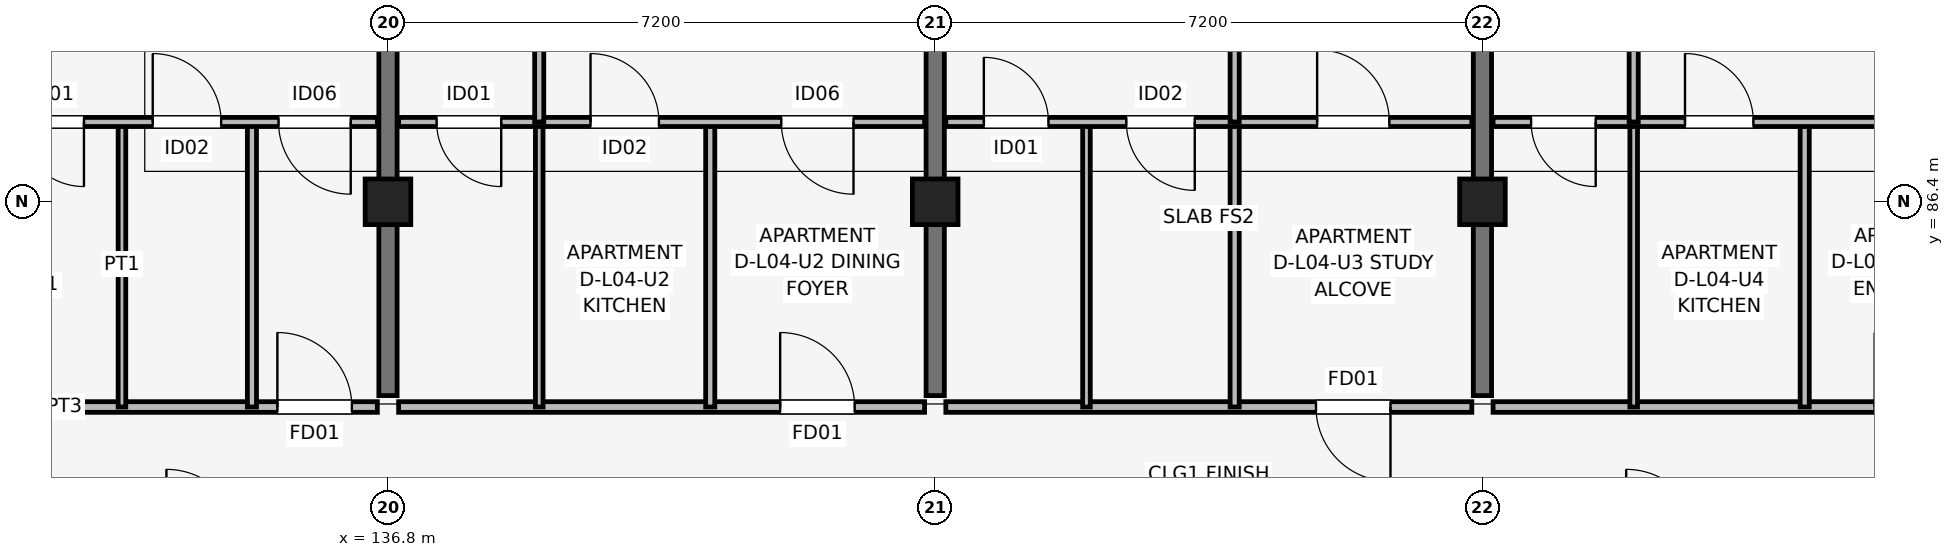
"""IFC4 building model, lengths in metres.
Left out: names, types, materials, properties, quantities, classifications, styles, units other than length and angle.
Written with IfcOpenShell. Run it as: python <this file> out.ifc"""

import sys

from ifc_helpers import new_model, si_unit, direction, frame, frame_2d, origin, origin_2d, place, context, subcontext, project, spatial, rectangle, extrude, element, fill, save


model = new_model("IFC4")
c1 = context("Model", 3, precision=1e-05, world=origin(), true_north=direction((0.0, 1.0)))
c2 = subcontext(c1, "Body", "Model", "MODEL_VIEW")
j1 = project(units=[si_unit("LENGTHUNIT", "METRE"), si_unit("PLANEANGLEUNIT", "RADIAN")], contexts=[c1])
p1 = place(None, origin())
s1 = spatial("IfcSite", under=j1, at=p1, CompositionType="ELEMENT")
p2 = place(p1, origin())
s2 = spatial("IfcBuilding", under=s1, at=p2, CompositionType="ELEMENT")
p3 = place(p2, frame((0.0, 0.0, 15.0)))
s3 = spatial("IfcBuildingStorey", under=s2, at=p3, CompositionType="ELEMENT", Elevation=15.0)
for number, where, z_axis, x_axis in (
    (1, (136.8, 86.4, 0.0), (0.0, 0.0, 1.0), (1.0, 0.0, 0.0)),
    (2, (144.0, 86.4, 0.0), (0.0, 0.0, 1.0), (1.0, 0.0, 0.0)),
    (3, (151.2, 86.4, 0.0), (0.0, 0.0, 1.0), (1.0, 0.0, 0.0)),
):
    element("IfcColumn", number, at=place(p3, frame(where, z_axis=z_axis, x_axis=x_axis)), inside=s3, PredefinedType="COLUMN", context=c2, shape_type="SweptSolid", body=[
        extrude(rectangle(XDim=0.6, YDim=0.6, at=origin_2d()), origin(), (0.0, 0.0, 1.0), 3.15),
    ])
for number, where, z_axis, x_axis in (
    (4, (136.8, 83.85, 0.0), (0.0, 0.0, 1.0), (0.0, 1.0, 0.0)),
    (5, (144.0, 83.85, 0.0), (0.0, 0.0, 1.0), (0.0, 1.0, 0.0)),
    (6, (151.2, 83.85, 0.0), (0.0, 0.0, 1.0), (0.0, 1.0, 0.0)),
):
    element("IfcWall", number, at=place(p3, frame(where, z_axis=z_axis, x_axis=x_axis)), inside=s3, PredefinedType="SHEAR", context=c2, shape_type="SweptSolid", body=[
        extrude(rectangle(XDim=9.4, YDim=0.24, at=frame_2d((4.7, 0.0))), origin(), (0.0, 0.0, 1.0), 3.15),
    ])
p4 = place(p3, frame((129.74, 83.7, 0.0), z_axis=(0.0, 0.0, 1.0), x_axis=(1.0, 0.0, 0.0)))
e7 = element("IfcWall", 7, at=p4, inside=s3, PredefinedType="PARTITIONING", context=c2, shape_type="SweptSolid", body=[
    extrude(rectangle(XDim=6.92, YDim=0.14, at=frame_2d((3.46, 0.0))), origin(), (0.0, 0.0, 1.0), 2.38),
])
p5 = place(p4, frame((5.605, 0.0, 0.0)))
e8 = element("IfcOpeningElement", 8, at=p5, cuts=e7, PredefinedType="OPENING", context=c2, shape_type="SweptSolid", body=[
    extrude(rectangle(XDim=0.98, YDim=2.1, at=frame_2d((0.49, 1.05))), frame((0.0, 0.08, 0.0), z_axis=(0.0, -1.0, 0.0), x_axis=(1.0, 0.0, 0.0)), (0.0, 0.0, 1.0), 0.16),
])
p6 = place(p3, frame((133.3, 83.7, 0.0), z_axis=(0.0, 0.0, 1.0), x_axis=(0.0, 1.0, 0.0)))
e9 = element("IfcWall", 9, at=p6, inside=s3, PredefinedType="PARTITIONING", context=c2, shape_type="SweptSolid", body=[
    extrude(rectangle(XDim=3.75, YDim=0.1, at=frame_2d((1.875, 0.0))), origin(), (0.0, 0.0, 1.0), 2.375),
])
p7 = place(p3, frame((135.01, 83.7, 0.0), z_axis=(0.0, 0.0, 1.0), x_axis=(0.0, 1.0, 0.0)))
e10 = element("IfcWall", 10, at=p7, inside=s3, PredefinedType="PARTITIONING", context=c2, shape_type="SweptSolid", body=[
    extrude(rectangle(XDim=3.75, YDim=0.12, at=frame_2d((1.875, 0.0))), origin(), (0.0, 0.0, 1.0), 2.375),
])
p8 = place(p3, frame((129.74, 87.45, 0.0), z_axis=(0.0, 0.0, 1.0), x_axis=(1.0, 0.0, 0.0)))
e11 = element("IfcWall", 11, at=p8, inside=s3, PredefinedType="PARTITIONING", context=c2, shape_type="SweptSolid", body=[
    extrude(rectangle(XDim=6.92, YDim=0.12, at=frame_2d((3.46, 0.0))), origin(), (0.0, 0.0, 1.0), 2.38),
])
p9 = place(p8, frame((3.06, 0.0, 0.0), z_axis=(0.0, 0.0, 1.0), x_axis=(-1.0, 0.0, 0.0)))
e12 = element("IfcOpeningElement", 12, at=p9, cuts=e11, PredefinedType="OPENING", context=c2, shape_type="SweptSolid", body=[
    extrude(rectangle(XDim=0.85, YDim=2.08, at=frame_2d((0.425, 1.04))), frame((0.0, 0.07, 0.0), z_axis=(0.0, -1.0, 0.0), x_axis=(1.0, 0.0, 0.0)), (0.0, 0.0, 1.0), 0.14),
])
p10 = place(p8, frame((3.965, 0.0, 0.0)))
e13 = element("IfcOpeningElement", 13, at=p10, cuts=e11, PredefinedType="OPENING", context=c2, shape_type="SweptSolid", body=[
    extrude(rectangle(XDim=0.9, YDim=2.08, at=frame_2d((0.45, 1.04))), frame((0.0, 0.07, 0.0), z_axis=(0.0, -1.0, 0.0), x_axis=(1.0, 0.0, 0.0)), (0.0, 0.0, 1.0), 0.14),
])
p11 = place(p8, frame((6.57, 0.0, 0.0), z_axis=(0.0, 0.0, 1.0), x_axis=(-1.0, 0.0, 0.0)))
e14 = element("IfcOpeningElement", 14, at=p11, cuts=e11, PredefinedType="OPENING", context=c2, shape_type="SweptSolid", body=[
    extrude(rectangle(XDim=0.95, YDim=2.08, at=frame_2d((0.475, 1.04))), frame((0.0, 0.07, 0.0), z_axis=(0.0, -1.0, 0.0), x_axis=(1.0, 0.0, 0.0)), (0.0, 0.0, 1.0), 0.14),
])
p12 = place(p3, frame((136.94, 83.7, 0.0), z_axis=(0.0, 0.0, 1.0), x_axis=(1.0, 0.0, 0.0)))
e15 = element("IfcWall", 15, at=p12, inside=s3, PredefinedType="PARTITIONING", context=c2, shape_type="SweptSolid", body=[
    extrude(rectangle(XDim=6.92, YDim=0.14, at=frame_2d((3.46, 0.0))), origin(), (0.0, 0.0, 1.0), 2.38),
])
p13 = place(p12, frame((5.02, 0.0, 0.0)))
e16 = element("IfcOpeningElement", 16, at=p13, cuts=e15, PredefinedType="OPENING", context=c2, shape_type="SweptSolid", body=[
    extrude(rectangle(XDim=0.98, YDim=2.1, at=frame_2d((0.49, 1.05))), frame((0.0, 0.08, 0.0), z_axis=(0.0, -1.0, 0.0), x_axis=(1.0, 0.0, 0.0)), (0.0, 0.0, 1.0), 0.16),
])
p14 = place(p3, frame((138.79, 83.7, 0.0), z_axis=(0.0, 0.0, 1.0), x_axis=(0.0, 1.0, 0.0)))
e17 = element("IfcWall", 17, at=p14, inside=s3, PredefinedType="PARTITIONING", context=c2, shape_type="SweptSolid", body=[
    extrude(rectangle(XDim=3.75, YDim=0.1, at=frame_2d((1.875, 0.0))), origin(), (0.0, 0.0, 1.0), 2.375),
])
p15 = place(p3, frame((141.04, 83.7, 0.0), z_axis=(0.0, 0.0, 1.0), x_axis=(0.0, 1.0, 0.0)))
e18 = element("IfcWall", 18, at=p15, inside=s3, PredefinedType="PARTITIONING", context=c2, shape_type="SweptSolid", body=[
    extrude(rectangle(XDim=3.75, YDim=0.12, at=frame_2d((1.875, 0.0))), origin(), (0.0, 0.0, 1.0), 2.375),
])
p16 = place(p3, frame((136.94, 87.45, 0.0), z_axis=(0.0, 0.0, 1.0), x_axis=(1.0, 0.0, 0.0)))
e19 = element("IfcWall", 19, at=p16, inside=s3, PredefinedType="PARTITIONING", context=c2, shape_type="SweptSolid", body=[
    extrude(rectangle(XDim=6.92, YDim=0.12, at=frame_2d((3.46, 0.0))), origin(), (0.0, 0.0, 1.0), 2.38),
])
p17 = place(p16, frame((1.35, 0.0, 0.0), z_axis=(0.0, 0.0, 1.0), x_axis=(-1.0, 0.0, 0.0)))
e20 = element("IfcOpeningElement", 20, at=p17, cuts=e19, PredefinedType="OPENING", context=c2, shape_type="SweptSolid", body=[
    extrude(rectangle(XDim=0.85, YDim=2.08, at=frame_2d((0.425, 1.04))), frame((0.0, 0.07, 0.0), z_axis=(0.0, -1.0, 0.0), x_axis=(1.0, 0.0, 0.0)), (0.0, 0.0, 1.0), 0.14),
])
p18 = place(p16, frame((2.525, 0.0, 0.0)))
e21 = element("IfcOpeningElement", 21, at=p18, cuts=e19, PredefinedType="OPENING", context=c2, shape_type="SweptSolid", body=[
    extrude(rectangle(XDim=0.9, YDim=2.08, at=frame_2d((0.45, 1.04))), frame((0.0, 0.07, 0.0), z_axis=(0.0, -1.0, 0.0), x_axis=(1.0, 0.0, 0.0)), (0.0, 0.0, 1.0), 0.14),
])
p19 = place(p16, frame((5.985, 0.0, 0.0), z_axis=(0.0, 0.0, 1.0), x_axis=(-1.0, 0.0, 0.0)))
e22 = element("IfcOpeningElement", 22, at=p19, cuts=e19, PredefinedType="OPENING", context=c2, shape_type="SweptSolid", body=[
    extrude(rectangle(XDim=0.95, YDim=2.08, at=frame_2d((0.475, 1.04))), frame((0.0, 0.07, 0.0), z_axis=(0.0, -1.0, 0.0), x_axis=(1.0, 0.0, 0.0)), (0.0, 0.0, 1.0), 0.14),
])
p20 = place(p3, frame((138.79, 87.45, 0.0), z_axis=(0.0, 0.0, 1.0), x_axis=(0.0, 1.0, 0.0)))
e23 = element("IfcWall", 23, at=p20, inside=s3, PredefinedType="PARTITIONING", context=c2, shape_type="SweptSolid", body=[
    extrude(rectangle(XDim=5.85, YDim=0.12, at=frame_2d((2.925, 0.0))), origin(), (0.0, 0.0, 1.0), 2.38),
])
p21 = place(p20, frame((2.475, 0.0, 0.0)))
e24 = element("IfcOpeningElement", 24, at=p21, cuts=e23, PredefinedType="OPENING", context=c2, shape_type="SweptSolid", body=[
    extrude(rectangle(XDim=0.9, YDim=2.08, at=frame_2d((0.45, 1.04))), frame((0.0, 0.07, 0.0), z_axis=(0.0, -1.0, 0.0), x_axis=(1.0, 0.0, 0.0)), (0.0, 0.0, 1.0), 0.14),
])
p22 = place(p3, frame((144.14, 83.7, 0.0), z_axis=(0.0, 0.0, 1.0), x_axis=(1.0, 0.0, 0.0)))
e25 = element("IfcWall", 25, at=p22, inside=s3, PredefinedType="PARTITIONING", context=c2, shape_type="SweptSolid", body=[
    extrude(rectangle(XDim=6.92, YDim=0.14, at=frame_2d((3.46, 0.0))), origin(), (0.0, 0.0, 1.0), 2.38),
])
p23 = place(p22, frame((5.85, 0.0, 0.0), z_axis=(0.0, 0.0, 1.0), x_axis=(-1.0, 0.0, 0.0)))
e26 = element("IfcOpeningElement", 26, at=p23, cuts=e25, PredefinedType="OPENING", context=c2, shape_type="SweptSolid", body=[
    extrude(rectangle(XDim=0.98, YDim=2.1, at=frame_2d((0.49, 1.05))), frame((0.0, 0.08, 0.0), z_axis=(0.0, -1.0, 0.0), x_axis=(1.0, 0.0, 0.0)), (0.0, 0.0, 1.0), 0.16),
])
p24 = place(p3, frame((145.99, 83.7, 0.0), z_axis=(0.0, 0.0, 1.0), x_axis=(0.0, 1.0, 0.0)))
e27 = element("IfcWall", 27, at=p24, inside=s3, PredefinedType="PARTITIONING", context=c2, shape_type="SweptSolid", body=[
    extrude(rectangle(XDim=3.75, YDim=0.1, at=frame_2d((1.875, 0.0))), origin(), (0.0, 0.0, 1.0), 2.375),
])
p25 = place(p3, frame((147.94, 83.7, 0.0), z_axis=(0.0, 0.0, 1.0), x_axis=(0.0, 1.0, 0.0)))
e28 = element("IfcWall", 28, at=p25, inside=s3, PredefinedType="PARTITIONING", context=c2, shape_type="SweptSolid", body=[
    extrude(rectangle(XDim=3.75, YDim=0.12, at=frame_2d((1.875, 0.0))), origin(), (0.0, 0.0, 1.0), 2.375),
])
p26 = place(p3, frame((144.14, 87.45, 0.0), z_axis=(0.0, 0.0, 1.0), x_axis=(1.0, 0.0, 0.0)))
e29 = element("IfcWall", 29, at=p26, inside=s3, PredefinedType="PARTITIONING", context=c2, shape_type="SweptSolid", body=[
    extrude(rectangle(XDim=6.92, YDim=0.12, at=frame_2d((3.46, 0.0))), origin(), (0.0, 0.0, 1.0), 2.38),
])
p27 = place(p26, frame((0.5, 0.0, 0.0)))
e30 = element("IfcOpeningElement", 30, at=p27, cuts=e29, PredefinedType="OPENING", context=c2, shape_type="SweptSolid", body=[
    extrude(rectangle(XDim=0.85, YDim=2.08, at=frame_2d((0.425, 1.04))), frame((0.0, 0.07, 0.0), z_axis=(0.0, -1.0, 0.0), x_axis=(1.0, 0.0, 0.0)), (0.0, 0.0, 1.0), 0.14),
])
p28 = place(p26, frame((3.275, 0.0, 0.0), z_axis=(0.0, 0.0, 1.0), x_axis=(-1.0, 0.0, 0.0)))
e31 = element("IfcOpeningElement", 31, at=p28, cuts=e29, PredefinedType="OPENING", context=c2, shape_type="SweptSolid", body=[
    extrude(rectangle(XDim=0.9, YDim=2.08, at=frame_2d((0.45, 1.04))), frame((0.0, 0.07, 0.0), z_axis=(0.0, -1.0, 0.0), x_axis=(1.0, 0.0, 0.0)), (0.0, 0.0, 1.0), 0.14),
])
p29 = place(p26, frame((4.885, 0.0, 0.0)))
e32 = element("IfcOpeningElement", 32, at=p29, cuts=e29, PredefinedType="OPENING", context=c2, shape_type="SweptSolid", body=[
    extrude(rectangle(XDim=0.95, YDim=2.08, at=frame_2d((0.475, 1.04))), frame((0.0, 0.07, 0.0), z_axis=(0.0, -1.0, 0.0), x_axis=(1.0, 0.0, 0.0)), (0.0, 0.0, 1.0), 0.14),
])
p30 = place(p3, frame((147.94, 87.45, 0.0), z_axis=(0.0, 0.0, 1.0), x_axis=(0.0, 1.0, 0.0)))
e33 = element("IfcWall", 33, at=p30, inside=s3, PredefinedType="PARTITIONING", context=c2, shape_type="SweptSolid", body=[
    extrude(rectangle(XDim=5.85, YDim=0.12, at=frame_2d((2.925, 0.0))), origin(), (0.0, 0.0, 1.0), 2.38),
])
p31 = place(p30, frame((3.375, 0.0, 0.0), z_axis=(0.0, 0.0, 1.0), x_axis=(-1.0, 0.0, 0.0)))
e34 = element("IfcOpeningElement", 34, at=p31, cuts=e33, PredefinedType="OPENING", context=c2, shape_type="SweptSolid", body=[
    extrude(rectangle(XDim=0.9, YDim=2.08, at=frame_2d((0.45, 1.04))), frame((0.0, 0.07, 0.0), z_axis=(0.0, -1.0, 0.0), x_axis=(1.0, 0.0, 0.0)), (0.0, 0.0, 1.0), 0.14),
])
p32 = place(p3, frame((151.34, 83.7, 0.0), z_axis=(0.0, 0.0, 1.0), x_axis=(1.0, 0.0, 0.0)))
e35 = element("IfcWall", 35, at=p32, inside=s3, PredefinedType="PARTITIONING", context=c2, shape_type="SweptSolid", body=[
    extrude(rectangle(XDim=6.92, YDim=0.14, at=frame_2d((3.46, 0.0))), origin(), (0.0, 0.0, 1.0), 2.38),
])
p33 = place(p32, frame((5.02, 0.0, 0.0)))
e36 = element("IfcOpeningElement", 36, at=p33, cuts=e35, PredefinedType="OPENING", context=c2, shape_type="SweptSolid", body=[
    extrude(rectangle(XDim=0.98, YDim=2.1, at=frame_2d((0.49, 1.05))), frame((0.0, 0.08, 0.0), z_axis=(0.0, -1.0, 0.0), x_axis=(1.0, 0.0, 0.0)), (0.0, 0.0, 1.0), 0.16),
])
p34 = place(p3, frame((153.19, 83.7, 0.0), z_axis=(0.0, 0.0, 1.0), x_axis=(0.0, 1.0, 0.0)))
e37 = element("IfcWall", 37, at=p34, inside=s3, PredefinedType="PARTITIONING", context=c2, shape_type="SweptSolid", body=[
    extrude(rectangle(XDim=3.75, YDim=0.1, at=frame_2d((1.875, 0.0))), origin(), (0.0, 0.0, 1.0), 2.375),
])
p35 = place(p3, frame((155.44, 83.7, 0.0), z_axis=(0.0, 0.0, 1.0), x_axis=(0.0, 1.0, 0.0)))
e38 = element("IfcWall", 38, at=p35, inside=s3, PredefinedType="PARTITIONING", context=c2, shape_type="SweptSolid", body=[
    extrude(rectangle(XDim=3.75, YDim=0.12, at=frame_2d((1.875, 0.0))), origin(), (0.0, 0.0, 1.0), 2.375),
])
p36 = place(p3, frame((151.34, 87.45, 0.0), z_axis=(0.0, 0.0, 1.0), x_axis=(1.0, 0.0, 0.0)))
e39 = element("IfcWall", 39, at=p36, inside=s3, PredefinedType="PARTITIONING", context=c2, shape_type="SweptSolid", body=[
    extrude(rectangle(XDim=6.92, YDim=0.12, at=frame_2d((3.46, 0.0))), origin(), (0.0, 0.0, 1.0), 2.38),
])
p37 = place(p36, frame((1.35, 0.0, 0.0), z_axis=(0.0, 0.0, 1.0), x_axis=(-1.0, 0.0, 0.0)))
e40 = element("IfcOpeningElement", 40, at=p37, cuts=e39, PredefinedType="OPENING", context=c2, shape_type="SweptSolid", body=[
    extrude(rectangle(XDim=0.85, YDim=2.08, at=frame_2d((0.425, 1.04))), frame((0.0, 0.07, 0.0), z_axis=(0.0, -1.0, 0.0), x_axis=(1.0, 0.0, 0.0)), (0.0, 0.0, 1.0), 0.14),
])
p38 = place(p36, frame((2.525, 0.0, 0.0)))
e41 = element("IfcOpeningElement", 41, at=p38, cuts=e39, PredefinedType="OPENING", context=c2, shape_type="SweptSolid", body=[
    extrude(rectangle(XDim=0.9, YDim=2.08, at=frame_2d((0.45, 1.04))), frame((0.0, 0.07, 0.0), z_axis=(0.0, -1.0, 0.0), x_axis=(1.0, 0.0, 0.0)), (0.0, 0.0, 1.0), 0.14),
])
p39 = place(p36, frame((5.985, 0.0, 0.0), z_axis=(0.0, 0.0, 1.0), x_axis=(-1.0, 0.0, 0.0)))
e42 = element("IfcOpeningElement", 42, at=p39, cuts=e39, PredefinedType="OPENING", context=c2, shape_type="SweptSolid", body=[
    extrude(rectangle(XDim=0.95, YDim=2.08, at=frame_2d((0.475, 1.04))), frame((0.0, 0.07, 0.0), z_axis=(0.0, -1.0, 0.0), x_axis=(1.0, 0.0, 0.0)), (0.0, 0.0, 1.0), 0.14),
])
p40 = place(p3, frame((153.19, 87.45, 0.0), z_axis=(0.0, 0.0, 1.0), x_axis=(0.0, 1.0, 0.0)))
e43 = element("IfcWall", 43, at=p40, inside=s3, PredefinedType="PARTITIONING", context=c2, shape_type="SweptSolid", body=[
    extrude(rectangle(XDim=5.85, YDim=0.12, at=frame_2d((2.925, 0.0))), origin(), (0.0, 0.0, 1.0), 2.38),
])
p41 = place(p40, frame((2.475, 0.0, 0.0)))
e44 = element("IfcOpeningElement", 44, at=p41, cuts=e43, PredefinedType="OPENING", context=c2, shape_type="SweptSolid", body=[
    extrude(rectangle(XDim=0.9, YDim=2.08, at=frame_2d((0.45, 1.04))), frame((0.0, 0.07, 0.0), z_axis=(0.0, -1.0, 0.0), x_axis=(1.0, 0.0, 0.0)), (0.0, 0.0, 1.0), 0.14),
])
p42 = place(p5, origin())
e45 = element("IfcDoor", 45, at=p42, inside=s3, OperationType="SINGLE_SWING_LEFT", PredefinedType="DOOR", context=c2, shape_type="SweptSolid", body=[
    extrude(rectangle(XDim=0.98, YDim=2.1, at=frame_2d((0.49, 1.05))), frame((0.0, 0.025, 0.0), z_axis=(0.0, -1.0, 0.0), x_axis=(1.0, 0.0, 0.0)), (0.0, 0.0, 1.0), 0.05),
])
fill(e8, e45)
p43 = place(p9, origin())
e46 = element("IfcDoor", 46, at=p43, inside=s3, OperationType="SINGLE_SWING_RIGHT", PredefinedType="DOOR", context=c2, shape_type="SweptSolid", body=[
    extrude(rectangle(XDim=0.85, YDim=2.08, at=frame_2d((0.425, 1.04))), frame((0.0, 0.025, 0.0), z_axis=(0.0, -1.0, 0.0), x_axis=(1.0, 0.0, 0.0)), (0.0, 0.0, 1.0), 0.05),
])
fill(e12, e46)
p44 = place(p10, origin())
e47 = element("IfcDoor", 47, at=p44, inside=s3, OperationType="SINGLE_SWING_LEFT", PredefinedType="DOOR", context=c2, shape_type="SweptSolid", body=[
    extrude(rectangle(XDim=0.9, YDim=2.08, at=frame_2d((0.45, 1.04))), frame((0.0, 0.025, 0.0), z_axis=(0.0, -1.0, 0.0), x_axis=(1.0, 0.0, 0.0)), (0.0, 0.0, 1.0), 0.05),
])
fill(e13, e47)
p45 = place(p11, origin())
e48 = element("IfcDoor", 48, at=p45, inside=s3, OperationType="SINGLE_SWING_RIGHT", PredefinedType="DOOR", context=c2, shape_type="SweptSolid", body=[
    extrude(rectangle(XDim=0.95, YDim=2.08, at=frame_2d((0.475, 1.04))), frame((0.0, 0.025, 0.0), z_axis=(0.0, -1.0, 0.0), x_axis=(1.0, 0.0, 0.0)), (0.0, 0.0, 1.0), 0.05),
])
fill(e14, e48)
p46 = place(p13, origin())
e49 = element("IfcDoor", 49, at=p46, inside=s3, OperationType="SINGLE_SWING_LEFT", PredefinedType="DOOR", context=c2, shape_type="SweptSolid", body=[
    extrude(rectangle(XDim=0.98, YDim=2.1, at=frame_2d((0.49, 1.05))), frame((0.0, 0.025, 0.0), z_axis=(0.0, -1.0, 0.0), x_axis=(1.0, 0.0, 0.0)), (0.0, 0.0, 1.0), 0.05),
])
fill(e16, e49)
p47 = place(p17, origin())
e50 = element("IfcDoor", 50, at=p47, inside=s3, OperationType="SINGLE_SWING_RIGHT", PredefinedType="DOOR", context=c2, shape_type="SweptSolid", body=[
    extrude(rectangle(XDim=0.85, YDim=2.08, at=frame_2d((0.425, 1.04))), frame((0.0, 0.025, 0.0), z_axis=(0.0, -1.0, 0.0), x_axis=(1.0, 0.0, 0.0)), (0.0, 0.0, 1.0), 0.05),
])
fill(e20, e50)
p48 = place(p18, origin())
e51 = element("IfcDoor", 51, at=p48, inside=s3, OperationType="SINGLE_SWING_LEFT", PredefinedType="DOOR", context=c2, shape_type="SweptSolid", body=[
    extrude(rectangle(XDim=0.9, YDim=2.08, at=frame_2d((0.45, 1.04))), frame((0.0, 0.025, 0.0), z_axis=(0.0, -1.0, 0.0), x_axis=(1.0, 0.0, 0.0)), (0.0, 0.0, 1.0), 0.05),
])
fill(e21, e51)
p49 = place(p19, origin())
e52 = element("IfcDoor", 52, at=p49, inside=s3, OperationType="SINGLE_SWING_RIGHT", PredefinedType="DOOR", context=c2, shape_type="SweptSolid", body=[
    extrude(rectangle(XDim=0.95, YDim=2.08, at=frame_2d((0.475, 1.04))), frame((0.0, 0.025, 0.0), z_axis=(0.0, -1.0, 0.0), x_axis=(1.0, 0.0, 0.0)), (0.0, 0.0, 1.0), 0.05),
])
fill(e22, e52)
p50 = place(p23, origin())
e53 = element("IfcDoor", 53, at=p50, inside=s3, OperationType="SINGLE_SWING_RIGHT", PredefinedType="DOOR", context=c2, shape_type="SweptSolid", body=[
    extrude(rectangle(XDim=0.98, YDim=2.1, at=frame_2d((0.49, 1.05))), frame((0.0, 0.025, 0.0), z_axis=(0.0, -1.0, 0.0), x_axis=(1.0, 0.0, 0.0)), (0.0, 0.0, 1.0), 0.05),
])
fill(e26, e53)
p51 = place(p27, origin())
e54 = element("IfcDoor", 54, at=p51, inside=s3, OperationType="SINGLE_SWING_LEFT", PredefinedType="DOOR", context=c2, shape_type="SweptSolid", body=[
    extrude(rectangle(XDim=0.85, YDim=2.08, at=frame_2d((0.425, 1.04))), frame((0.0, 0.025, 0.0), z_axis=(0.0, -1.0, 0.0), x_axis=(1.0, 0.0, 0.0)), (0.0, 0.0, 1.0), 0.05),
])
fill(e30, e54)
p52 = place(p28, origin())
e55 = element("IfcDoor", 55, at=p52, inside=s3, OperationType="SINGLE_SWING_RIGHT", PredefinedType="DOOR", context=c2, shape_type="SweptSolid", body=[
    extrude(rectangle(XDim=0.9, YDim=2.08, at=frame_2d((0.45, 1.04))), frame((0.0, 0.025, 0.0), z_axis=(0.0, -1.0, 0.0), x_axis=(1.0, 0.0, 0.0)), (0.0, 0.0, 1.0), 0.05),
])
fill(e31, e55)
p53 = place(p29, origin())
e56 = element("IfcDoor", 56, at=p53, inside=s3, OperationType="SINGLE_SWING_LEFT", PredefinedType="DOOR", context=c2, shape_type="SweptSolid", body=[
    extrude(rectangle(XDim=0.95, YDim=2.08, at=frame_2d((0.475, 1.04))), frame((0.0, 0.025, 0.0), z_axis=(0.0, -1.0, 0.0), x_axis=(1.0, 0.0, 0.0)), (0.0, 0.0, 1.0), 0.05),
])
fill(e32, e56)
p54 = place(p37, origin())
e57 = element("IfcDoor", 57, at=p54, inside=s3, OperationType="SINGLE_SWING_RIGHT", PredefinedType="DOOR", context=c2, shape_type="SweptSolid", body=[
    extrude(rectangle(XDim=0.85, YDim=2.08, at=frame_2d((0.425, 1.04))), frame((0.0, 0.025, 0.0), z_axis=(0.0, -1.0, 0.0), x_axis=(1.0, 0.0, 0.0)), (0.0, 0.0, 1.0), 0.05),
])
fill(e40, e57)
p55 = place(p38, origin())
e58 = element("IfcDoor", 58, at=p55, inside=s3, OperationType="SINGLE_SWING_LEFT", PredefinedType="DOOR", context=c2, shape_type="SweptSolid", body=[
    extrude(rectangle(XDim=0.9, YDim=2.08, at=frame_2d((0.45, 1.04))), frame((0.0, 0.025, 0.0), z_axis=(0.0, -1.0, 0.0), x_axis=(1.0, 0.0, 0.0)), (0.0, 0.0, 1.0), 0.05),
])
fill(e41, e58)
save(model, sys.argv[1])
